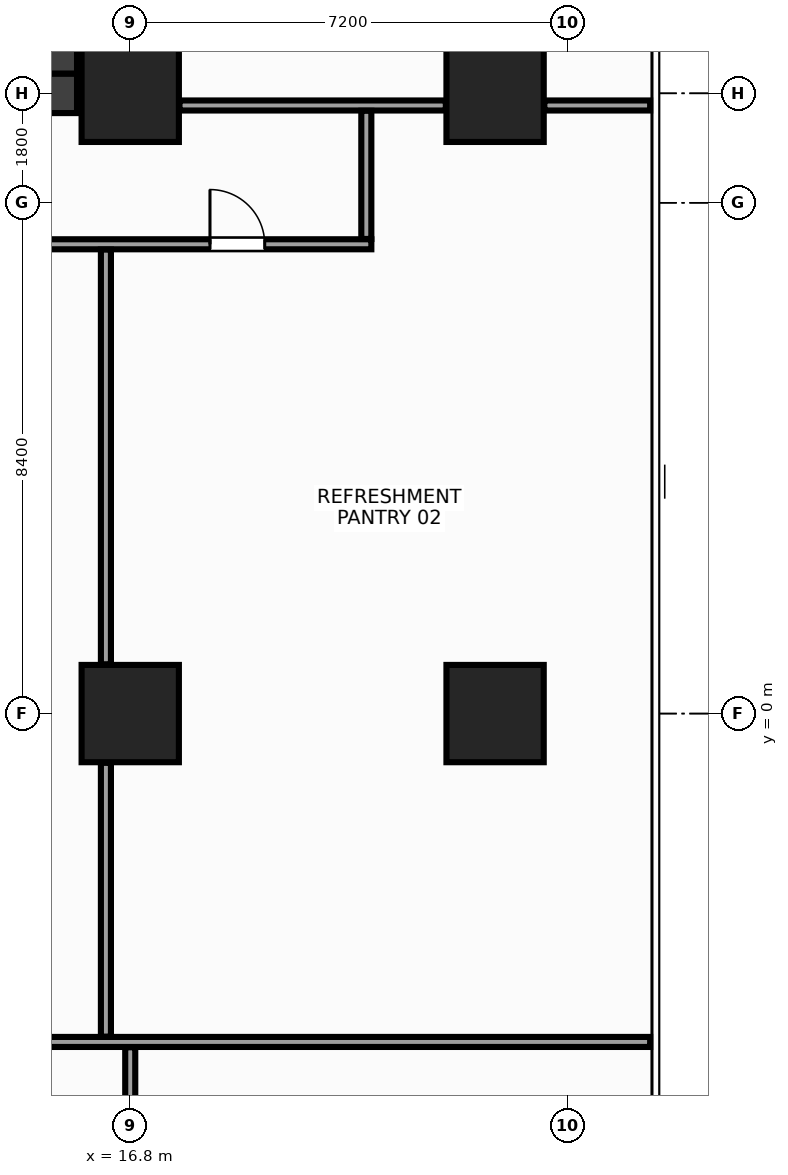
"""IFC4 building model, lengths in metres.
Left out: names, types, materials, properties, quantities, classifications, styles, units other than length and angle.
Written with IfcOpenShell. Run it as: python <this file> out.ifc"""

import sys

from ifc_helpers import new_model, si_unit, direction, frame, frame_2d, origin, origin_2d, place, context, subcontext, project, spatial, rectangle, extrude, source, transform, mapped, element, fill, save


model = new_model("IFC4")
c1 = context("Model", 3, precision=1e-05, world=origin(), true_north=direction((0.0, 1.0)))
c2 = subcontext(c1, "Body", "Model", "MODEL_VIEW")
j1 = project(units=[si_unit("LENGTHUNIT", "METRE"), si_unit("PLANEANGLEUNIT", "RADIAN")], contexts=[c1])
p1 = place(None, origin())
s1 = spatial("IfcSite", under=j1, at=p1, CompositionType="ELEMENT")
p2 = place(p1, origin())
s2 = spatial("IfcBuilding", under=s1, at=p2, CompositionType="ELEMENT")
p3 = place(p2, frame((0.0, 0.0, 106.4)))
s3 = spatial("IfcBuildingStorey", under=s2, at=p3, CompositionType="ELEMENT", Elevation=106.4)
m1 = source(origin(), c2, "Body", "SweptSolid", [
    extrude(rectangle(XDim=31.85, YDim=0.65, at=frame_2d((15.925, 0.0))), origin(), (0.0, 0.0, 1.0), 3.6),
])
p4 = place(p3, frame((-15.925, 10.2, 0.0), z_axis=(0.0, 0.0, 1.0), x_axis=(1.0, 0.0, 0.0)))
e1 = element("IfcWall", 1, at=p4, inside=s3, PredefinedType="SHEAR", context=c2, shape_type="MappedRepresentation", body=[
    mapped(m1, transform((0.0, 0.0, 0.0), x_axis=(1.0, 0.0, 0.0), y_axis=(0.0, 1.0, 0.0), z_axis=(0.0, 0.0, 1.0), scale=1.0)),
])
p5 = place(p4, frame((1.775, 0.0, 0.0)))
e2 = element("IfcOpeningElement", 2, at=p5, cuts=e1, PredefinedType="OPENING", context=c2, shape_type="SweptSolid", body=[
    extrude(rectangle(XDim=1.6, YDim=2.15, at=frame_2d((0.8, 1.075))), frame((0.0, 0.337, 0.0), z_axis=(0.0, -1.0, 0.0), x_axis=(1.0, 0.0, 0.0)), (0.0, 0.0, 1.0), 0.674),
])
p6 = place(p4, frame((28.475, 0.0, 0.0)))
e3 = element("IfcOpeningElement", 3, at=p6, cuts=e1, PredefinedType="OPENING", context=c2, shape_type="SweptSolid", body=[
    extrude(rectangle(XDim=1.6, YDim=2.15, at=frame_2d((0.8, 1.075))), frame((0.0, 0.337, 0.0), z_axis=(0.0, -1.0, 0.0), x_axis=(1.0, 0.0, 0.0)), (0.0, 0.0, 1.0), 0.674),
])
p7 = place(p4, frame((15.175, 0.0, 0.0)))
e4 = element("IfcOpeningElement", 4, at=p7, cuts=e1, PredefinedType="OPENING", context=c2, shape_type="SweptSolid", body=[
    extrude(rectangle(XDim=1.5, YDim=2.2, at=frame_2d((0.75, 1.1))), frame((0.0, 0.337, 0.0), z_axis=(0.0, -1.0, 0.0), x_axis=(1.0, 0.0, 0.0)), (0.0, 0.0, 1.0), 0.674),
])
m2 = source(origin(), c2, "Body", "SweptSolid", [
    extrude(rectangle(XDim=12.95, YDim=0.65, at=frame_2d((6.475, 0.0))), origin(), (0.0, 0.0, 1.0), 3.6),
])
p8 = place(p3, frame((15.6, 10.525, 0.0), z_axis=(0.0, 0.0, 1.0), x_axis=(0.0, 1.0, 0.0)))
e5 = element("IfcWall", 5, at=p8, inside=s3, PredefinedType="SHEAR", context=c2, shape_type="MappedRepresentation", body=[
    mapped(m2, transform((0.0, 0.0, 0.0), x_axis=(1.0, 0.0, 0.0), y_axis=(0.0, 1.0, 0.0), z_axis=(0.0, 0.0, 1.0), scale=1.0)),
])
m3 = source(origin(), c2, "Body", "SweptSolid", [
    extrude(rectangle(XDim=1.6, YDim=1.6, at=origin_2d()), origin(), (0.0, 0.0, 1.0), 3.6),
])
for number, where, z_axis, x_axis in (
    (6, (16.8, 0.0, 0.0), (0.0, 0.0, 1.0), (1.0, 0.0, 0.0)),
    (7, (16.8, 10.2, 0.0), (0.0, 0.0, 1.0), (1.0, 0.0, 0.0)),
    (8, (22.8, 0.0, 0.0), (0.0, 0.0, 1.0), (1.0, 0.0, 0.0)),
    (9, (22.8, 10.2, 0.0), (0.0, 0.0, 1.0), (1.0, 0.0, 0.0)),
):
    element("IfcColumn", number, at=place(p3, frame(where, z_axis=z_axis, x_axis=x_axis)), inside=s3, PredefinedType="COLUMN", context=c2, shape_type="MappedRepresentation", body=[
        mapped(m3, transform((0.0, 0.0, 0.0), x_axis=(1.0, 0.0, 0.0), y_axis=(0.0, 1.0, 0.0), z_axis=(0.0, 0.0, 1.0), scale=1.0)),
    ])
m4 = source(origin(), c2, "Body", "SweptSolid", [
    extrude(rectangle(XDim=4.38, YDim=0.165, at=frame_2d((2.19, 0.0))), origin(), (0.0, 0.0, 1.0), 2.745),
])
p9 = place(p3, frame((17.61, 10.0, 0.0), z_axis=(0.0, 0.0, 1.0), x_axis=(1.0, 0.0, 0.0)))
e10 = element("IfcWall", 10, at=p9, inside=s3, PredefinedType="PARTITIONING", context=c2, shape_type="MappedRepresentation", body=[
    mapped(m4, transform((0.0, 0.0, 0.0), x_axis=(1.0, 0.0, 0.0), y_axis=(0.0, 1.0, 0.0), z_axis=(0.0, 0.0, 1.0), scale=1.0)),
])
m5 = source(origin(), c2, "Body", "SweptSolid", [
    extrude(rectangle(XDim=1.74, YDim=0.165, at=frame_2d((0.87, 0.0))), origin(), (0.0, 0.0, 1.0), 3.36),
])
p10 = place(p3, frame((23.61, 10.0, 0.0), z_axis=(0.0, 0.0, 1.0), x_axis=(1.0, 0.0, 0.0)))
e11 = element("IfcWall", 11, at=p10, inside=s3, PredefinedType="PARTITIONING", context=c2, shape_type="MappedRepresentation", body=[
    mapped(m5, transform((0.0, 0.0, 0.0), x_axis=(1.0, 0.0, 0.0), y_axis=(0.0, 1.0, 0.0), z_axis=(0.0, 0.0, 1.0), scale=1.0)),
])
m6 = source(origin(), c2, "Body", "SweptSolid", [
    extrude(rectangle(XDim=22.3, YDim=0.165, at=frame_2d((11.15, 0.0))), origin(), (0.0, 0.0, 1.0), 2.745),
])
p11 = place(p3, frame((-1.535, 7.718, 0.0), z_axis=(0.0, 0.0, 1.0), x_axis=(1.0, 0.0, 0.0)))
e12 = element("IfcWall", 12, at=p11, inside=s3, PredefinedType="PARTITIONING", context=c2, shape_type="MappedRepresentation", body=[
    mapped(m6, transform((0.0, 0.0, 0.0), x_axis=(1.0, 0.0, 0.0), y_axis=(0.0, 1.0, 0.0), z_axis=(0.0, 0.0, 1.0), scale=1.0)),
])
p12 = place(p11, frame((19.646, 0.0, 0.0)))
e13 = element("IfcOpeningElement", 13, at=p12, cuts=e12, PredefinedType="OPENING", context=c2, shape_type="SweptSolid", body=[
    extrude(rectangle(XDim=0.9, YDim=2.15, at=frame_2d((0.45, 1.075))), frame((0.0, 0.094, 0.0), z_axis=(0.0, -1.0, 0.0), x_axis=(1.0, 0.0, 0.0)), (0.0, 0.0, 1.0), 0.189),
])
p13 = place(p11, frame((2.236, 0.0, 0.0)))
e14 = element("IfcOpeningElement", 14, at=p13, cuts=e12, PredefinedType="OPENING", context=c2, shape_type="SweptSolid", body=[
    extrude(rectangle(XDim=0.9, YDim=2.15, at=frame_2d((0.45, 1.075))), frame((0.0, 0.094, 0.0), z_axis=(0.0, -1.0, 0.0), x_axis=(1.0, 0.0, 0.0)), (0.0, 0.0, 1.0), 0.189),
])
p14 = place(p11, frame((11.185, 0.0, 0.0)))
e15 = element("IfcOpeningElement", 15, at=p14, cuts=e12, PredefinedType="OPENING", context=c2, shape_type="SweptSolid", body=[
    extrude(rectangle(XDim=0.9, YDim=2.15, at=frame_2d((0.45, 1.075))), frame((0.0, 0.094, 0.0), z_axis=(0.0, -1.0, 0.0), x_axis=(1.0, 0.0, 0.0)), (0.0, 0.0, 1.0), 0.189),
])
m7 = source(origin(), c2, "Body", "SweptSolid", [
    extrude(rectangle(XDim=2.108, YDim=0.165, at=frame_2d((1.054, 0.0))), origin(), (0.0, 0.0, 1.0), 3.36),
])
p15 = place(p3, frame((20.683, 7.805, 0.0), z_axis=(0.0, 0.0, 1.0), x_axis=(0.0, 1.0, 0.0)))
e16 = element("IfcWall", 16, at=p15, inside=s3, PredefinedType="PARTITIONING", context=c2, shape_type="MappedRepresentation", body=[
    mapped(m7, transform((0.0, 0.0, 0.0), x_axis=(1.0, 0.0, 0.0), y_axis=(0.0, 1.0, 0.0), z_axis=(0.0, 0.0, 1.0), scale=1.0)),
])
m8 = source(origin(), c2, "Body", "SweptSolid", [
    extrude(rectangle(XDim=26.88, YDim=0.165, at=frame_2d((13.44, 0.0))), origin(), (0.0, 0.0, 1.0), 2.745),
])
p16 = place(p3, frame((-1.53, -5.4, 0.0), z_axis=(0.0, 0.0, 1.0), x_axis=(1.0, 0.0, 0.0)))
e17 = element("IfcWall", 17, at=p16, inside=s3, PredefinedType="PARTITIONING", context=c2, shape_type="MappedRepresentation", body=[
    mapped(m8, transform((0.0, 0.0, 0.0), x_axis=(1.0, 0.0, 0.0), y_axis=(0.0, 1.0, 0.0), z_axis=(0.0, 0.0, 1.0), scale=1.0)),
])
m9 = source(origin(), c2, "Body", "SweptSolid", [
    extrude(rectangle(XDim=4.502, YDim=0.165, at=frame_2d((2.251, 0.0))), origin(), (0.0, 0.0, 1.0), 3.36),
])
p17 = place(p3, frame((16.4, -5.312, 0.0), z_axis=(0.0, 0.0, 1.0), x_axis=(0.0, 1.0, 0.0)))
e18 = element("IfcWall", 18, at=p17, inside=s3, PredefinedType="PARTITIONING", context=c2, shape_type="MappedRepresentation", body=[
    mapped(m9, transform((0.0, 0.0, 0.0), x_axis=(1.0, 0.0, 0.0), y_axis=(0.0, 1.0, 0.0), z_axis=(0.0, 0.0, 1.0), scale=1.0)),
])
m10 = source(origin(), c2, "Body", "SweptSolid", [
    extrude(rectangle(XDim=6.82, YDim=0.165, at=frame_2d((3.41, 0.0))), origin(), (0.0, 0.0, 1.0), 2.645),
])
p18 = place(p3, frame((16.4, 0.81, 0.0), z_axis=(0.0, 0.0, 1.0), x_axis=(0.0, 1.0, 0.0)))
e19 = element("IfcWall", 19, at=p18, inside=s3, PredefinedType="PARTITIONING", context=c2, shape_type="MappedRepresentation", body=[
    mapped(m10, transform((0.0, 0.0, 0.0), x_axis=(1.0, 0.0, 0.0), y_axis=(0.0, 1.0, 0.0), z_axis=(0.0, 0.0, 1.0), scale=1.0)),
])
m11 = source(origin(), c2, "Body", "SweptSolid", [
    extrude(rectangle(XDim=3.142, YDim=0.165, at=frame_2d((1.571, 0.0))), origin(), (0.0, 0.0, 1.0), 2.745),
])
p19 = place(p3, frame((16.8, -8.63, 0.0), z_axis=(0.0, 0.0, 1.0), x_axis=(0.0, 1.0, 0.0)))
e20 = element("IfcWall", 20, at=p19, inside=s3, PredefinedType="PARTITIONING", context=c2, shape_type="MappedRepresentation", body=[
    mapped(m11, transform((0.0, 0.0, 0.0), x_axis=(1.0, 0.0, 0.0), y_axis=(0.0, 1.0, 0.0), z_axis=(0.0, 0.0, 1.0), scale=1.0)),
])
m12 = source(origin(), c2, "Body", "SweptSolid", [
    extrude(rectangle(XDim=0.9, YDim=2.15, at=frame_2d((0.45, 1.075))), frame((0.0, 0.025, 0.0), z_axis=(0.0, -1.0, 0.0), x_axis=(1.0, 0.0, 0.0)), (0.0, 0.0, 1.0), 0.05),
])
p20 = place(p12, origin())
e21 = element("IfcDoor", 21, at=p20, inside=s3, OperationType="SINGLE_SWING_LEFT", PredefinedType="DOOR", context=c2, shape_type="MappedRepresentation", body=[
    mapped(m12, transform((0.0, 0.0, 0.0), x_axis=(1.0, 0.0, 0.0), y_axis=(0.0, 1.0, 0.0), z_axis=(0.0, 0.0, 1.0), scale=1.0)),
])
fill(e13, e21)
save(model, sys.argv[1])
